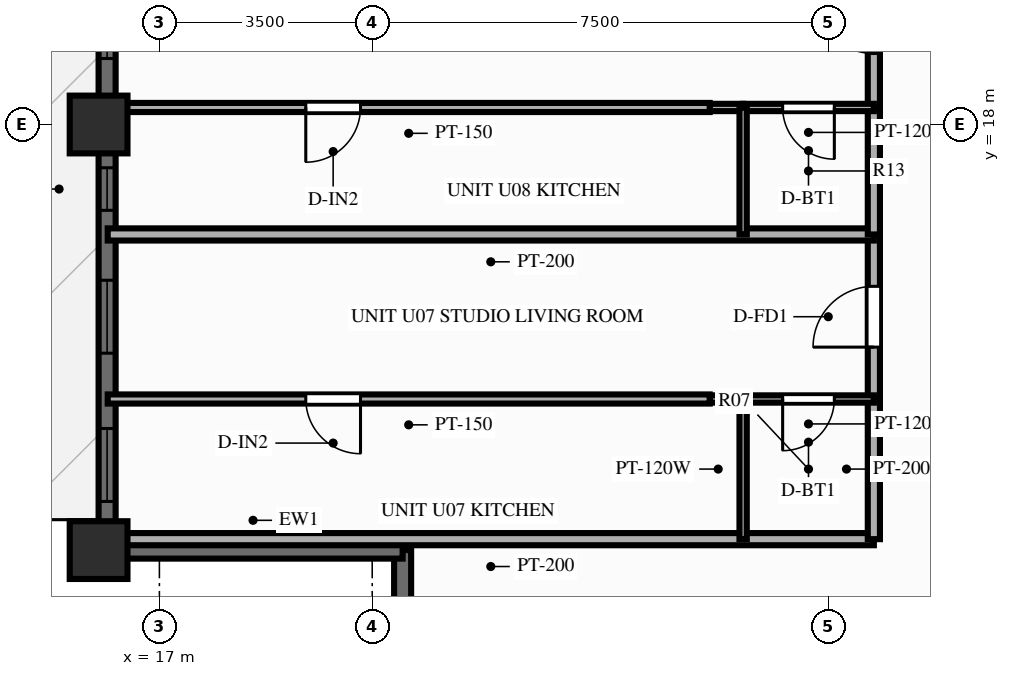
"""IFC4 building model, lengths in metres.
Left out: names, types, materials, properties, quantities, classifications, styles, units other than length and angle.
Written with IfcOpenShell. Run it as: python <this file> out.ifc"""

import sys

from ifc_helpers import new_model, si_unit, direction, frame, frame_2d, origin, origin_2d, place, context, subcontext, project, spatial, rectangle, extrude, source, transform, mapped, element, fill, save


model = new_model("IFC4")
c1 = context("Model", 3, precision=1e-05, world=origin(), true_north=direction((0.0, 1.0)))
c2 = subcontext(c1, "Body", "Model", "MODEL_VIEW")
j1 = project(units=[si_unit("LENGTHUNIT", "METRE"), si_unit("PLANEANGLEUNIT", "RADIAN")], contexts=[c1])
p1 = place(None, origin())
s1 = spatial("IfcSite", under=j1, at=p1, CompositionType="ELEMENT")
p2 = place(p1, origin())
s2 = spatial("IfcBuilding", under=s1, at=p2, CompositionType="ELEMENT")
p3 = place(p2, frame((0.0, 0.0, 169.0)))
s3 = spatial("IfcBuildingStorey", under=s2, at=p3, CompositionType="ELEMENT", Elevation=169.0)
m1 = source(origin(), c2, "Body", "SweptSolid", [
    extrude(rectangle(XDim=0.95, YDim=0.95, at=origin_2d()), origin(), (0.0, 0.0, 1.0), 3.9),
])
for number, where, z_axis, x_axis in (
    (1, (16.0, 18.0, 0.0), (0.0, 0.0, 1.0), (1.0, 0.0, 0.0)),
    (2, (16.0, 11.0, 0.0), (0.0, 0.0, 1.0), (1.0, 0.0, 0.0)),
):
    element("IfcColumn", number, at=place(p3, frame(where, z_axis=z_axis, x_axis=x_axis)), inside=s3, PredefinedType="COLUMN", context=c2, shape_type="MappedRepresentation", body=[
        mapped(m1, transform((0.0, 0.0, 0.0), scale=1.0)),
    ])
p4 = place(p3, frame((16.14, 11.0, 0.0), z_axis=(0.0, 0.0, 1.0), x_axis=(0.0, 1.0, 0.0)))
e3 = element("IfcWall", 3, at=p4, inside=s3, PredefinedType="SOLIDWALL", context=c2, shape_type="SweptSolid", body=[
    extrude(rectangle(XDim=32.0, YDim=0.28, at=frame_2d((16.0, 0.0))), origin(), (0.0, 0.0, 1.0), 2.44),
])
p5 = place(p4, frame((0.8, 0.0, 0.25)))
e4 = element("IfcOpeningElement", 4, at=p5, cuts=e3, PredefinedType="OPENING", context=c2, shape_type="SweptSolid", body=[
    extrude(rectangle(XDim=1.2, YDim=1.5, at=frame_2d((0.6, 0.75))), frame((0.0, 0.152, 0.0), z_axis=(0.0, -1.0, 0.0), x_axis=(1.0, 0.0, 0.0)), (0.0, 0.0, 1.0), 0.304),
])
p6 = place(p4, frame((3.239, 0.0, 0.25)))
e5 = element("IfcOpeningElement", 5, at=p6, cuts=e3, PredefinedType="OPENING", context=c2, shape_type="SweptSolid", body=[
    extrude(rectangle(XDim=1.2, YDim=1.5, at=frame_2d((0.6, 0.75))), frame((0.0, 0.152, 0.0), z_axis=(0.0, -1.0, 0.0), x_axis=(1.0, 0.0, 0.0)), (0.0, 0.0, 1.0), 0.304),
])
p7 = place(p4, frame((5.588, 0.0, 0.25)))
e6 = element("IfcOpeningElement", 6, at=p7, cuts=e3, PredefinedType="OPENING", context=c2, shape_type="SweptSolid", body=[
    extrude(rectangle(XDim=0.7, YDim=1.5, at=frame_2d((0.35, 0.75))), frame((0.0, 0.152, 0.0), z_axis=(0.0, -1.0, 0.0), x_axis=(1.0, 0.0, 0.0)), (0.0, 0.0, 1.0), 0.304),
])
p8 = place(p4, frame((8.085, 0.0, 0.25)))
e7 = element("IfcOpeningElement", 7, at=p8, cuts=e3, PredefinedType="OPENING", context=c2, shape_type="SweptSolid", body=[
    extrude(rectangle(XDim=1.2, YDim=1.5, at=frame_2d((0.6, 0.75))), frame((0.0, 0.152, 0.0), z_axis=(0.0, -1.0, 0.0), x_axis=(1.0, 0.0, 0.0)), (0.0, 0.0, 1.0), 0.304),
])
p9 = place(p4, frame((10.575, 0.0, 0.25)))
e8 = element("IfcOpeningElement", 8, at=p9, cuts=e3, PredefinedType="OPENING", context=c2, shape_type="SweptSolid", body=[
    extrude(rectangle(XDim=1.2, YDim=1.5, at=frame_2d((0.6, 0.75))), frame((0.0, 0.152, 0.0), z_axis=(0.0, -1.0, 0.0), x_axis=(1.0, 0.0, 0.0)), (0.0, 0.0, 1.0), 0.304),
])
p10 = place(p4, frame((13.007, 0.0, 0.25)))
e9 = element("IfcOpeningElement", 9, at=p10, cuts=e3, PredefinedType="OPENING", context=c2, shape_type="SweptSolid", body=[
    extrude(rectangle(XDim=1.2, YDim=1.5, at=frame_2d((0.6, 0.75))), frame((0.0, 0.152, 0.0), z_axis=(0.0, -1.0, 0.0), x_axis=(1.0, 0.0, 0.0)), (0.0, 0.0, 1.0), 0.304),
])
p11 = place(p4, frame((15.4, 0.0, 0.25)))
e10 = element("IfcOpeningElement", 10, at=p11, cuts=e3, PredefinedType="OPENING", context=c2, shape_type="SweptSolid", body=[
    extrude(rectangle(XDim=1.2, YDim=1.5, at=frame_2d((0.6, 0.75))), frame((0.0, 0.152, 0.0), z_axis=(0.0, -1.0, 0.0), x_axis=(1.0, 0.0, 0.0)), (0.0, 0.0, 1.0), 0.304),
])
p12 = place(p4, frame((17.673, 0.0, 0.0)))
e11 = element("IfcOpeningElement", 11, at=p12, cuts=e3, PredefinedType="OPENING", context=c2, shape_type="SweptSolid", body=[
    extrude(rectangle(XDim=1.6, YDim=2.15, at=frame_2d((0.8, 1.075))), frame((0.0, 0.152, 0.0), z_axis=(0.0, -1.0, 0.0), x_axis=(1.0, 0.0, 0.0)), (0.0, 0.0, 1.0), 0.304),
])
p13 = place(p4, frame((20.452, 0.0, 0.25)))
e12 = element("IfcOpeningElement", 12, at=p13, cuts=e3, PredefinedType="OPENING", context=c2, shape_type="SweptSolid", body=[
    extrude(rectangle(XDim=1.2, YDim=1.5, at=frame_2d((0.6, 0.75))), frame((0.0, 0.152, 0.0), z_axis=(0.0, -1.0, 0.0), x_axis=(1.0, 0.0, 0.0)), (0.0, 0.0, 1.0), 0.304),
])
p14 = place(p4, frame((22.862, 0.0, 0.25)))
e13 = element("IfcOpeningElement", 13, at=p14, cuts=e3, PredefinedType="OPENING", context=c2, shape_type="SweptSolid", body=[
    extrude(rectangle(XDim=1.2, YDim=1.5, at=frame_2d((0.6, 0.75))), frame((0.0, 0.152, 0.0), z_axis=(0.0, -1.0, 0.0), x_axis=(1.0, 0.0, 0.0)), (0.0, 0.0, 1.0), 0.304),
])
p15 = place(p4, frame((25.734, 0.0, 0.25)))
e14 = element("IfcOpeningElement", 14, at=p15, cuts=e3, PredefinedType="OPENING", context=c2, shape_type="SweptSolid", body=[
    extrude(rectangle(XDim=0.95, YDim=1.5, at=frame_2d((0.475, 0.75))), frame((0.0, 0.152, 0.0), z_axis=(0.0, -1.0, 0.0), x_axis=(1.0, 0.0, 0.0)), (0.0, 0.0, 1.0), 0.304),
])
p16 = place(p4, frame((27.777, 0.0, 0.25)))
e15 = element("IfcOpeningElement", 15, at=p16, cuts=e3, PredefinedType="OPENING", context=c2, shape_type="SweptSolid", body=[
    extrude(rectangle(XDim=1.2, YDim=1.5, at=frame_2d((0.6, 0.75))), frame((0.0, 0.152, 0.0), z_axis=(0.0, -1.0, 0.0), x_axis=(1.0, 0.0, 0.0)), (0.0, 0.0, 1.0), 0.304),
])
p17 = place(p4, frame((30.068, 0.0, 0.25)))
e16 = element("IfcOpeningElement", 16, at=p17, cuts=e3, PredefinedType="OPENING", context=c2, shape_type="SweptSolid", body=[
    extrude(rectangle(XDim=1.2, YDim=1.5, at=frame_2d((0.6, 0.75))), frame((0.0, 0.152, 0.0), z_axis=(0.0, -1.0, 0.0), x_axis=(1.0, 0.0, 0.0)), (0.0, 0.0, 1.0), 0.304),
])
for number, where, z_axis, x_axis in (
    (17, (21.0, 6.08, 0.0), (0.0, 0.0, 1.0), (0.0, 1.0, 0.0)),
    (18, (16.08, 11.0, 0.0), (0.0, 0.0, 1.0), (1.0, 0.0, 0.0)),
):
    element("IfcWall", number, at=place(p3, frame(where, z_axis=z_axis, x_axis=x_axis)), inside=s3, PredefinedType="SOLIDWALL", context=c2, shape_type="SweptSolid", body=[
        extrude(rectangle(XDim=4.92, YDim=0.28, at=frame_2d((2.46, 0.0))), origin(), (0.0, 0.0, 1.0), 2.44),
    ])
p18 = place(p3, frame((28.75, 11.18, 0.0), z_axis=(0.0, 0.0, 1.0), x_axis=(-1.0, 0.0, 0.0)))
e19 = element("IfcWall", 19, at=p18, inside=s3, PredefinedType="PARTITIONING", context=c2, shape_type="SweptSolid", body=[
    extrude(rectangle(XDim=12.6, YDim=0.2, at=frame_2d((6.3, 0.0))), origin(), (0.0, 0.0, 1.0), 2.24),
])
p19 = place(p3, frame((28.75, 11.18, 0.0), z_axis=(0.0, 0.0, 1.0), x_axis=(0.0, 1.0, 0.0)))
e20 = element("IfcWall", 20, at=p19, inside=s3, PredefinedType="PARTITIONING", context=c2, shape_type="SweptSolid", body=[
    extrude(rectangle(XDim=2.305, YDim=0.2, at=frame_2d((1.153, 0.0))), origin(), (0.0, 0.0, 1.0), 3.56),
])
p20 = place(p3, frame((28.75, 13.485, 0.0), z_axis=(0.0, 0.0, 1.0), x_axis=(0.0, 1.0, 0.0)))
e21 = element("IfcWall", 21, at=p20, inside=s3, PredefinedType="PARTITIONING", context=c2, shape_type="SweptSolid", body=[
    extrude(rectangle(XDim=2.706, YDim=0.2, at=frame_2d((1.353, 0.0))), origin(), (0.0, 0.0, 1.0), 3.56),
])
p21 = place(p20, frame((0.853, 0.0, 0.0)))
e22 = element("IfcOpeningElement", 22, at=p21, cuts=e21, PredefinedType="OPENING", context=c2, shape_type="SweptSolid", body=[
    extrude(rectangle(XDim=1.0, YDim=2.15, at=frame_2d((0.5, 1.075))), frame((0.0, 0.112, 0.0), z_axis=(0.0, -1.0, 0.0), x_axis=(1.0, 0.0, 0.0)), (0.0, 0.0, 1.0), 0.224),
])
p22 = place(p3, frame((28.75, 13.485, 0.0), z_axis=(0.0, 0.0, 1.0), x_axis=(-1.0, 0.0, 0.0)))
e23 = element("IfcWall", 23, at=p22, inside=s3, PredefinedType="PARTITIONING", context=c2, shape_type="SweptSolid", body=[
    extrude(rectangle(XDim=2.15, YDim=0.12, at=frame_2d((1.075, 0.0))), origin(), (0.0, 0.0, 1.0), 3.56),
])
p23 = place(p22, frame((0.65, 0.0, 0.0)))
e24 = element("IfcOpeningElement", 24, at=p23, cuts=e23, PredefinedType="OPENING", context=c2, shape_type="SweptSolid", body=[
    extrude(rectangle(XDim=0.85, YDim=2.05, at=frame_2d((0.425, 1.025))), frame((0.0, 0.072, 0.0), z_axis=(0.0, -1.0, 0.0), x_axis=(1.0, 0.0, 0.0)), (0.0, 0.0, 1.0), 0.144),
])
p24 = place(p3, frame((26.6, 13.485, 0.0), z_axis=(0.0, 0.0, 1.0), x_axis=(-1.0, 0.0, 0.0)))
e25 = element("IfcWall", 25, at=p24, inside=s3, PredefinedType="PARTITIONING", context=c2, shape_type="SweptSolid", body=[
    extrude(rectangle(XDim=0.55, YDim=0.12, at=frame_2d((0.275, 0.0))), origin(), (0.0, 0.0, 1.0), 3.56),
])
p25 = place(p3, frame((26.6, 11.18, 0.0), z_axis=(0.0, 0.0, 1.0), x_axis=(0.0, 1.0, 0.0)))
e26 = element("IfcWall", 26, at=p25, inside=s3, PredefinedType="PARTITIONING", context=c2, shape_type="SweptSolid", body=[
    extrude(rectangle(XDim=2.305, YDim=0.12, at=frame_2d((1.153, 0.0))), origin(), (0.0, 0.0, 1.0), 3.56),
])
p26 = place(p3, frame((26.05, 13.485, 0.0), z_axis=(0.0, 0.0, 1.0), x_axis=(-1.0, 0.0, 0.0)))
e27 = element("IfcWall", 27, at=p26, inside=s3, PredefinedType="PARTITIONING", context=c2, shape_type="SweptSolid", body=[
    extrude(rectangle(XDim=9.9, YDim=0.15, at=frame_2d((4.95, 0.0))), origin(), (0.0, 0.0, 1.0), 3.56),
])
p27 = place(p26, frame((5.742, 0.0, 0.0)))
e28 = element("IfcOpeningElement", 28, at=p27, cuts=e27, PredefinedType="OPENING", context=c2, shape_type="SweptSolid", body=[
    extrude(rectangle(XDim=0.9, YDim=2.1, at=frame_2d((0.45, 1.05))), frame((0.0, 0.087, 0.0), z_axis=(0.0, -1.0, 0.0), x_axis=(1.0, 0.0, 0.0)), (0.0, 0.0, 1.0), 0.174),
])
p28 = place(p3, frame((28.75, 16.192, 0.0), z_axis=(0.0, 0.0, 1.0), x_axis=(-1.0, 0.0, 0.0)))
e29 = element("IfcWall", 29, at=p28, inside=s3, PredefinedType="PARTITIONING", context=c2, shape_type="SweptSolid", body=[
    extrude(rectangle(XDim=12.6, YDim=0.2, at=frame_2d((6.3, 0.0))), origin(), (0.0, 0.0, 1.0), 3.56),
])
p29 = place(p3, frame((28.75, 16.192, 0.0), z_axis=(0.0, 0.0, 1.0), x_axis=(0.0, 1.0, 0.0)))
e30 = element("IfcWall", 30, at=p29, inside=s3, PredefinedType="PARTITIONING", context=c2, shape_type="SweptSolid", body=[
    extrude(rectangle(XDim=2.088, YDim=0.2, at=frame_2d((1.044, 0.0))), origin(), (0.0, 0.0, 1.0), 3.56),
])
p30 = place(p3, frame((28.75, 18.28, 0.0), z_axis=(0.0, 0.0, 1.0), x_axis=(0.0, 1.0, 0.0)))
e31 = element("IfcWall", 31, at=p30, inside=s3, PredefinedType="PARTITIONING", context=c2, shape_type="SweptSolid", body=[
    extrude(rectangle(XDim=2.776, YDim=0.2, at=frame_2d((1.388, 0.0))), origin(), (0.0, 0.0, 1.0), 3.56),
])
p31 = place(p30, frame((0.888, 0.0, 0.0)))
e32 = element("IfcOpeningElement", 32, at=p31, cuts=e31, PredefinedType="OPENING", context=c2, shape_type="SweptSolid", body=[
    extrude(rectangle(XDim=1.0, YDim=2.15, at=frame_2d((0.5, 1.075))), frame((0.0, 0.112, 0.0), z_axis=(0.0, -1.0, 0.0), x_axis=(1.0, 0.0, 0.0)), (0.0, 0.0, 1.0), 0.224),
])
p32 = place(p3, frame((28.75, 18.28, 0.0), z_axis=(0.0, 0.0, 1.0), x_axis=(-1.0, 0.0, 0.0)))
e33 = element("IfcWall", 33, at=p32, inside=s3, PredefinedType="PARTITIONING", context=c2, shape_type="SweptSolid", body=[
    extrude(rectangle(XDim=2.15, YDim=0.12, at=frame_2d((1.075, 0.0))), origin(), (0.0, 0.0, 1.0), 3.56),
])
p33 = place(p32, frame((0.65, 0.0, 0.0)))
e34 = element("IfcOpeningElement", 34, at=p33, cuts=e33, PredefinedType="OPENING", context=c2, shape_type="SweptSolid", body=[
    extrude(rectangle(XDim=0.85, YDim=2.05, at=frame_2d((0.425, 1.025))), frame((0.0, 0.072, 0.0), z_axis=(0.0, -1.0, 0.0), x_axis=(1.0, 0.0, 0.0)), (0.0, 0.0, 1.0), 0.144),
])
p34 = place(p3, frame((26.6, 18.28, 0.0), z_axis=(0.0, 0.0, 1.0), x_axis=(-1.0, 0.0, 0.0)))
e35 = element("IfcWall", 35, at=p34, inside=s3, PredefinedType="PARTITIONING", context=c2, shape_type="SweptSolid", body=[
    extrude(rectangle(XDim=0.55, YDim=0.12, at=frame_2d((0.275, 0.0))), origin(), (0.0, 0.0, 1.0), 3.56),
])
p35 = place(p3, frame((26.6, 16.192, 0.0), z_axis=(0.0, 0.0, 1.0), x_axis=(0.0, 1.0, 0.0)))
e36 = element("IfcWall", 36, at=p35, inside=s3, PredefinedType="PARTITIONING", context=c2, shape_type="SweptSolid", body=[
    extrude(rectangle(XDim=2.088, YDim=0.12, at=frame_2d((1.044, 0.0))), origin(), (0.0, 0.0, 1.0), 3.56),
])
p36 = place(p3, frame((26.05, 18.28, 0.0), z_axis=(0.0, 0.0, 1.0), x_axis=(-1.0, 0.0, 0.0)))
e37 = element("IfcWall", 37, at=p36, inside=s3, PredefinedType="PARTITIONING", context=c2, shape_type="SweptSolid", body=[
    extrude(rectangle(XDim=9.9, YDim=0.15, at=frame_2d((4.95, 0.0))), origin(), (0.0, 0.0, 1.0), 3.56),
])
p37 = place(p36, frame((5.742, 0.0, 0.0)))
e38 = element("IfcOpeningElement", 38, at=p37, cuts=e37, PredefinedType="OPENING", context=c2, shape_type="SweptSolid", body=[
    extrude(rectangle(XDim=0.9, YDim=2.1, at=frame_2d((0.45, 1.05))), frame((0.0, 0.087, 0.0), z_axis=(0.0, -1.0, 0.0), x_axis=(1.0, 0.0, 0.0)), (0.0, 0.0, 1.0), 0.174),
])
m2 = source(origin(), c2, "Body", "SweptSolid", [
    extrude(rectangle(XDim=1.2, YDim=1.5, at=frame_2d((0.6, 0.75))), frame((0.0, 0.03, 0.0), z_axis=(0.0, -1.0, 0.0), x_axis=(1.0, 0.0, 0.0)), (0.0, 0.0, 1.0), 0.06),
])
p38 = place(p5, origin())
e39 = element("IfcWindow", 39, at=p38, inside=s3, PartitioningType="SINGLE_PANEL", PredefinedType="WINDOW", context=c2, shape_type="MappedRepresentation", body=[
    mapped(m2, transform((0.0, 0.0, 0.0), scale=1.0)),
])
fill(e4, e39)
p39 = place(p6, origin())
e40 = element("IfcWindow", 40, at=p39, inside=s3, PartitioningType="SINGLE_PANEL", PredefinedType="WINDOW", context=c2, shape_type="MappedRepresentation", body=[
    mapped(m2, transform((0.0, 0.0, 0.0), scale=1.0)),
])
fill(e5, e40)
m3 = source(origin(), c2, "Body", "SweptSolid", [
    extrude(rectangle(XDim=0.7, YDim=1.5, at=frame_2d((0.35, 0.75))), frame((0.0, 0.03, 0.0), z_axis=(0.0, -1.0, 0.0), x_axis=(1.0, 0.0, 0.0)), (0.0, 0.0, 1.0), 0.06),
])
p40 = place(p7, origin())
e41 = element("IfcWindow", 41, at=p40, inside=s3, PartitioningType="SINGLE_PANEL", PredefinedType="WINDOW", context=c2, shape_type="MappedRepresentation", body=[
    mapped(m3, transform((0.0, 0.0, 0.0), scale=1.0)),
])
fill(e6, e41)
p41 = place(p8, origin())
e42 = element("IfcWindow", 42, at=p41, inside=s3, PartitioningType="SINGLE_PANEL", PredefinedType="WINDOW", context=c2, shape_type="MappedRepresentation", body=[
    mapped(m2, transform((0.0, 0.0, 0.0), scale=1.0)),
])
fill(e7, e42)
m4 = source(origin(), c2, "Body", "SweptSolid", [
    extrude(rectangle(XDim=1.0, YDim=2.15, at=frame_2d((0.5, 1.075))), frame((0.0, 0.025, 0.0), z_axis=(0.0, -1.0, 0.0), x_axis=(1.0, 0.0, 0.0)), (0.0, 0.0, 1.0), 0.05),
])
p42 = place(p21, origin())
e43 = element("IfcDoor", 43, at=p42, inside=s3, OperationType="SINGLE_SWING_LEFT", PredefinedType="DOOR", context=c2, shape_type="MappedRepresentation", body=[
    mapped(m4, transform((0.0, 0.0, 0.0), scale=1.0)),
])
fill(e22, e43)
m5 = source(origin(), c2, "Body", "SweptSolid", [
    extrude(rectangle(XDim=0.85, YDim=2.05, at=frame_2d((0.425, 1.025))), frame((0.0, 0.025, 0.0), z_axis=(0.0, -1.0, 0.0), x_axis=(1.0, 0.0, 0.0)), (0.0, 0.0, 1.0), 0.05),
])
p43 = place(p23, origin())
e44 = element("IfcDoor", 44, at=p43, inside=s3, OperationType="SINGLE_SWING_RIGHT", PredefinedType="DOOR", context=c2, shape_type="MappedRepresentation", body=[
    mapped(m5, transform((0.0, 0.0, 0.0), scale=1.0)),
])
fill(e24, e44)
m6 = source(origin(), c2, "Body", "SweptSolid", [
    extrude(rectangle(XDim=0.9, YDim=2.1, at=frame_2d((0.45, 1.05))), frame((0.0, 0.025, 0.0), z_axis=(0.0, -1.0, 0.0), x_axis=(1.0, 0.0, 0.0)), (0.0, 0.0, 1.0), 0.05),
])
p44 = place(p27, origin())
e45 = element("IfcDoor", 45, at=p44, inside=s3, OperationType="SINGLE_SWING_LEFT", PredefinedType="DOOR", context=c2, shape_type="MappedRepresentation", body=[
    mapped(m6, transform((0.0, 0.0, 0.0), scale=1.0)),
])
fill(e28, e45)
p45 = place(p31, origin())
e46 = element("IfcDoor", 46, at=p45, inside=s3, OperationType="SINGLE_SWING_RIGHT", PredefinedType="DOOR", context=c2, shape_type="MappedRepresentation", body=[
    mapped(m4, transform((0.0, 0.0, 0.0), scale=1.0)),
])
fill(e32, e46)
p46 = place(p33, origin())
e47 = element("IfcDoor", 47, at=p46, inside=s3, OperationType="SINGLE_SWING_LEFT", PredefinedType="DOOR", context=c2, shape_type="MappedRepresentation", body=[
    mapped(m5, transform((0.0, 0.0, 0.0), scale=1.0)),
])
fill(e34, e47)
p47 = place(p37, origin())
e48 = element("IfcDoor", 48, at=p47, inside=s3, OperationType="SINGLE_SWING_RIGHT", PredefinedType="DOOR", context=c2, shape_type="MappedRepresentation", body=[
    mapped(m6, transform((0.0, 0.0, 0.0), scale=1.0)),
])
fill(e38, e48)
save(model, sys.argv[1])
